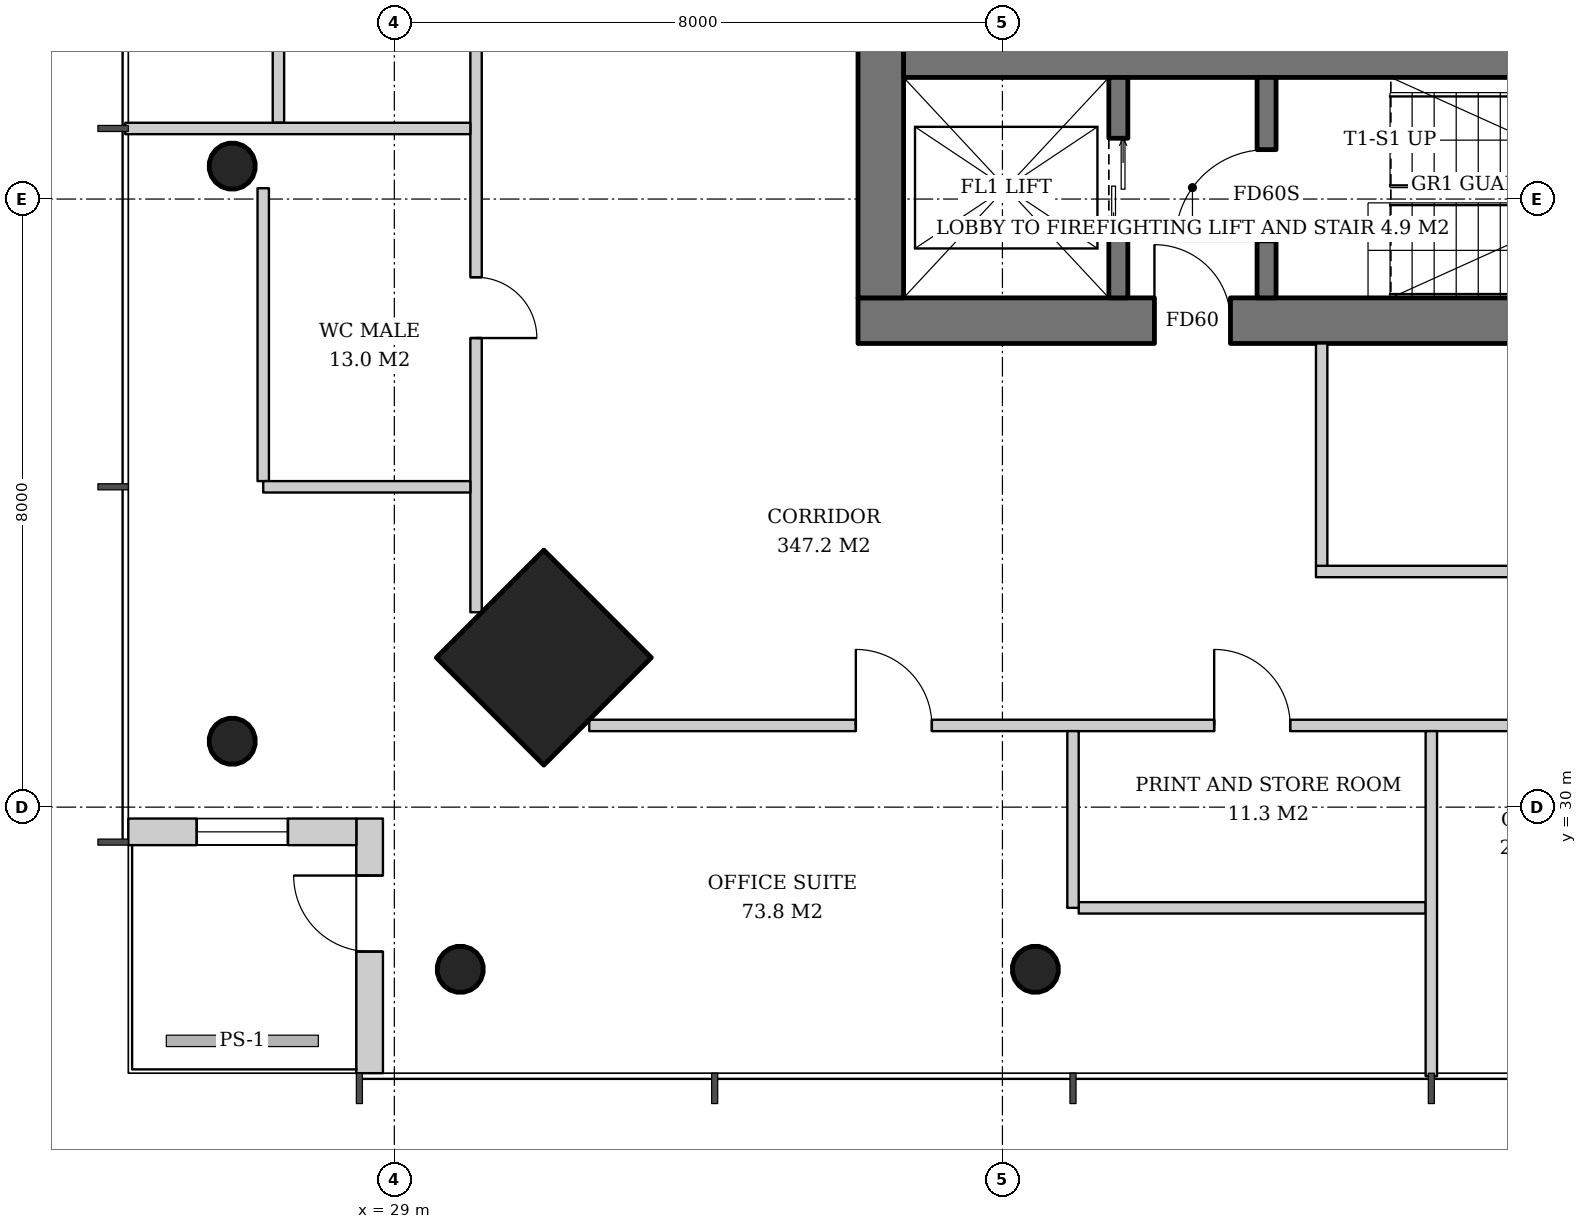
"""IFC4 building model, lengths in metres.
Left out: names, types, materials, properties, quantities, classifications, styles, units other than length and angle.
Written with IfcOpenShell. Run it as: python <this file> out.ifc"""

import sys

from ifc_helpers import new_model, si_unit, direction, frame, frame_2d, origin, origin_2d, place, context, subcontext, project, spatial, rectangle, hollow_circle, extrude, element, fill, save


model = new_model("IFC4")
c1 = context("Model", 3, precision=1e-05, world=origin(), true_north=direction((0.0, 1.0)))
c2 = subcontext(c1, "Body", "Model", "MODEL_VIEW")
j1 = project(units=[si_unit("LENGTHUNIT", "METRE"), si_unit("PLANEANGLEUNIT", "RADIAN")], contexts=[c1])
p1 = place(None, origin())
s1 = spatial("IfcSite", under=j1, at=p1, CompositionType="ELEMENT")
p2 = place(p1, origin())
s2 = spatial("IfcBuilding", under=s1, at=p2, CompositionType="ELEMENT")
p3 = place(p2, frame((0.0, 0.0, 203.4)))
s3 = spatial("IfcBuildingStorey", under=s2, at=p3, CompositionType="ELEMENT", Elevation=203.4)
p4 = place(p3, frame((30.928, 31.928, 0.0), z_axis=(0.031962158256, 0.031962158256, 0.998977898093), x_axis=(-0.707106781187, 0.707106781187, 0.0)))
e1 = element("IfcColumn", 1, at=p4, inside=s3, PredefinedType="COLUMN", context=c2, shape_type="SweptSolid", body=[
    extrude(rectangle(XDim=2.0, YDim=2.0, at=origin_2d()), origin(), (0.0, 0.0, 1.0), 3.804),
])
p5 = place(p3, frame((26.829, 30.829, 0.0), z_axis=(0.031898107953, 0.031898107953, 0.998981992539), x_axis=(-0.707106781187, 0.707106781187, 0.0)))
e2 = element("IfcColumn", 2, at=p5, inside=s3, PredefinedType="COLUMN", context=c2, shape_type="SweptSolid", body=[
    extrude(hollow_circle(Radius=0.305, WallThickness=0.025, at=origin_2d()), origin(), (0.0, 0.0, 1.0), 3.804),
])
p6 = place(p3, frame((26.829, 38.414, 0.0), z_axis=(0.031910269556, 0.015987237665, 0.999362868496), x_axis=(-0.447933021895, 0.894067115991, 0.0)))
e3 = element("IfcColumn", 3, at=p6, inside=s3, PredefinedType="COLUMN", context=c2, shape_type="SweptSolid", body=[
    extrude(hollow_circle(Radius=0.305, WallThickness=0.025, at=origin_2d()), origin(), (0.0, 0.0, 1.0), 3.802),
])
p7 = place(p3, frame((29.829, 27.829, 0.0), z_axis=(0.031898107953, 0.031898107953, 0.998981992539), x_axis=(-0.707106781187, 0.707106781187, 0.0)))
e4 = element("IfcColumn", 4, at=p7, inside=s3, PredefinedType="COLUMN", context=c2, shape_type="SweptSolid", body=[
    extrude(hollow_circle(Radius=0.305, WallThickness=0.025, at=origin_2d()), origin(), (0.0, 0.0, 1.0), 3.804),
])
p8 = place(p3, frame((37.414, 27.829, 0.0), z_axis=(0.015987237665, 0.031910269556, 0.999362868496), x_axis=(-0.894067115991, 0.447933021895, 0.0)))
e5 = element("IfcColumn", 5, at=p8, inside=s3, PredefinedType="COLUMN", context=c2, shape_type="SweptSolid", body=[
    extrude(hollow_circle(Radius=0.305, WallThickness=0.025, at=origin_2d()), origin(), (0.0, 0.0, 1.0), 3.802),
])
p9 = place(p3, frame((35.1, 36.4, 0.0), z_axis=(0.0, 0.0, 1.0), x_axis=(1.0, 0.0, 0.0)))
e6 = element("IfcWall", 6, at=p9, inside=s3, PredefinedType="SHEAR", context=c2, shape_type="SweptSolid", body=[
    extrude(rectangle(XDim=19.8, YDim=0.6, at=frame_2d((9.9, 0.0))), origin(), (0.0, 0.0, 1.0), 3.8),
])
p10 = place(p9, frame((3.9, 0.0, 0.0)))
e7 = element("IfcOpeningElement", 7, at=p10, cuts=e6, PredefinedType="OPENING", context=c2, shape_type="SweptSolid", body=[
    extrude(rectangle(XDim=1.0, YDim=2.1, at=frame_2d((0.5, 1.05))), frame((0.0, 0.31, 0.0), z_axis=(0.0, -1.0, 0.0), x_axis=(1.0, 0.0, 0.0)), (0.0, 0.0, 1.0), 0.62),
])
p11 = place(p9, frame((15.35, 0.0, 0.0)))
e8 = element("IfcOpeningElement", 8, at=p11, cuts=e6, PredefinedType="OPENING", context=c2, shape_type="SweptSolid", body=[
    extrude(rectangle(XDim=1.0, YDim=2.1, at=frame_2d((0.5, 1.05))), frame((0.0, 0.31, 0.0), z_axis=(0.0, -1.0, 0.0), x_axis=(1.0, 0.0, 0.0)), (0.0, 0.0, 1.0), 0.62),
])
p12 = place(p3, frame((35.4, 36.7, 0.0), z_axis=(0.0, 0.0, 1.0), x_axis=(0.0, 1.0, 0.0)))
e9 = element("IfcWall", 9, at=p12, inside=s3, PredefinedType="SHEAR", context=c2, shape_type="SweptSolid", body=[
    extrude(rectangle(XDim=18.6, YDim=0.6, at=frame_2d((9.3, 0.0))), origin(), (0.0, 0.0, 1.0), 3.8),
])
p13 = place(p12, frame((8.4, 0.0, 0.0)))
e10 = element("IfcOpeningElement", 10, at=p13, cuts=e9, PredefinedType="OPENING", context=c2, shape_type="SweptSolid", body=[
    extrude(rectangle(XDim=1.8, YDim=2.4, at=frame_2d((0.9, 1.2))), frame((0.0, 0.31, 0.0), z_axis=(0.0, -1.0, 0.0), x_axis=(1.0, 0.0, 0.0)), (0.0, 0.0, 1.0), 0.62),
])
p14 = place(p3, frame((35.7, 39.8, 0.0), z_axis=(0.0, 0.0, 1.0), x_axis=(1.0, 0.0, 0.0)))
e11 = element("IfcWall", 11, at=p14, inside=s3, PredefinedType="SHEAR", context=c2, shape_type="SweptSolid", body=[
    extrude(rectangle(XDim=18.6, YDim=0.4, at=frame_2d((9.3, 0.0))), origin(), (0.0, 0.0, 1.0), 3.8),
])
p15 = place(p3, frame((28.675, 26.5, 0.0), z_axis=(0.0, 0.0, 1.0), x_axis=(0.0, 1.0, 0.0)))
e12 = element("IfcWall", 12, at=p15, inside=s3, PredefinedType="SOLIDWALL", context=c2, shape_type="SweptSolid", body=[
    extrude(rectangle(XDim=3.35, YDim=0.35, at=frame_2d((1.675, 0.0))), origin(), (0.0, 0.0, 1.0), 3.62),
])
p16 = place(p15, frame((1.6, 0.0, 0.0)))
e13 = element("IfcOpeningElement", 13, at=p16, cuts=e12, PredefinedType="OPENING", context=c2, shape_type="SweptSolid", body=[
    extrude(rectangle(XDim=1.0, YDim=2.4, at=frame_2d((0.5, 1.2))), frame((0.0, 0.185, 0.0), z_axis=(0.0, -1.0, 0.0), x_axis=(1.0, 0.0, 0.0)), (0.0, 0.0, 1.0), 0.37),
])
p17 = place(p3, frame((28.5, 29.675, 0.0), z_axis=(0.0, 0.0, 1.0), x_axis=(-1.0, 0.0, 0.0)))
e14 = element("IfcWall", 14, at=p17, inside=s3, PredefinedType="SOLIDWALL", context=c2, shape_type="SweptSolid", body=[
    extrude(rectangle(XDim=3.0, YDim=0.35, at=frame_2d((1.5, 0.0))), origin(), (0.0, 0.0, 1.0), 3.62),
])
p18 = place(p17, frame((0.9, 0.0, 0.6)))
e15 = element("IfcOpeningElement", 15, at=p18, cuts=e14, PredefinedType="OPENING", context=c2, shape_type="SweptSolid", body=[
    extrude(rectangle(XDim=1.2, YDim=2.55, at=frame_2d((0.6, 1.275))), frame((0.0, 0.185, 0.0), z_axis=(0.0, -1.0, 0.0), x_axis=(1.0, 0.0, 0.0)), (0.0, 0.0, 1.0), 0.37),
])
p19 = place(p3, frame((38.525, 36.7, 0.0), z_axis=(0.0, 0.0, 1.0), x_axis=(0.0, 1.0, 0.0)))
e16 = element("IfcWall", 16, at=p19, inside=s3, PredefinedType="SHEAR", context=c2, shape_type="SweptSolid", body=[
    extrude(rectangle(XDim=2.9, YDim=0.25, at=frame_2d((1.45, 0.0))), origin(), (0.0, 0.0, 1.0), 3.8),
])
p20 = place(p19, frame((0.8, 0.0, 0.0)))
e17 = element("IfcOpeningElement", 17, at=p20, cuts=e16, PredefinedType="OPENING", context=c2, shape_type="SweptSolid", body=[
    extrude(rectangle(XDim=1.3, YDim=2.2, at=frame_2d((0.65, 1.1))), frame((0.0, 0.135, 0.0), z_axis=(0.0, -1.0, 0.0), x_axis=(1.0, 0.0, 0.0)), (0.0, 0.0, 1.0), 0.27),
])
p21 = place(p3, frame((40.475, 36.7, 0.0), z_axis=(0.0, 0.0, 1.0), x_axis=(0.0, 1.0, 0.0)))
e18 = element("IfcWall", 18, at=p21, inside=s3, PredefinedType="SHEAR", context=c2, shape_type="SweptSolid", body=[
    extrude(rectangle(XDim=2.9, YDim=0.25, at=frame_2d((1.45, 0.0))), origin(), (0.0, 0.0, 1.0), 3.8),
])
p22 = place(p21, frame((0.75, 0.0, 0.0)))
e19 = element("IfcOpeningElement", 19, at=p22, cuts=e18, PredefinedType="OPENING", context=c2, shape_type="SweptSolid", body=[
    extrude(rectangle(XDim=1.2, YDim=2.1, at=frame_2d((0.6, 1.05))), frame((0.0, 0.135, 0.0), z_axis=(0.0, -1.0, 0.0), x_axis=(1.0, 0.0, 0.0)), (0.0, 0.0, 1.0), 0.27),
])
p23 = place(p3, frame((41.125, 33.1, 0.0), z_axis=(0.0, 0.0, 1.0), x_axis=(1.0, 0.0, 0.0)))
e20 = element("IfcWall", 20, at=p23, inside=s3, PredefinedType="PARTITIONING", context=c2, shape_type="SweptSolid", body=[
    extrude(rectangle(XDim=8.2, YDim=0.15, at=frame_2d((4.1, 0.0))), origin(), (0.0, 0.0, 1.0), 2.867),
])
p24 = place(p23, frame((3.6, 0.0, 0.0)))
e21 = element("IfcOpeningElement", 21, at=p24, cuts=e20, PredefinedType="OPENING", context=c2, shape_type="SweptSolid", body=[
    extrude(rectangle(XDim=1.0, YDim=2.1, at=frame_2d((0.5, 1.05))), frame((0.0, 0.085, 0.0), z_axis=(0.0, -1.0, 0.0), x_axis=(1.0, 0.0, 0.0)), (0.0, 0.0, 1.0), 0.17),
])
p25 = place(p3, frame((41.2, 36.1, 0.0), z_axis=(0.0, 0.0, 1.0), x_axis=(0.0, -1.0, 0.0)))
e22 = element("IfcWall", 22, at=p25, inside=s3, PredefinedType="PARTITIONING", context=c2, shape_type="SweptSolid", body=[
    extrude(rectangle(XDim=2.925, YDim=0.15, at=frame_2d((1.462, 0.0))), origin(), (0.0, 0.0, 1.0), 3.62),
])
p26 = place(p3, frame((27.475, 43.568, 0.0), z_axis=(0.0, 0.0, 1.0), x_axis=(0.0, -1.0, 0.0)))
e23 = element("IfcWall", 23, at=p26, inside=s3, PredefinedType="PARTITIONING", context=c2, shape_type="SweptSolid", body=[
    extrude(rectangle(XDim=4.564, YDim=0.15, at=frame_2d((2.282, 0.0))), origin(), (0.0, 0.0, 1.0), 2.867),
])
p27 = place(p3, frame((27.275, 38.143, 0.0), z_axis=(0.0, 0.0, 1.0), x_axis=(0.0, -1.0, 0.0)))
e24 = element("IfcWall", 24, at=p27, inside=s3, PredefinedType="PARTITIONING", context=c2, shape_type="SweptSolid", body=[
    extrude(rectangle(XDim=3.853, YDim=0.15, at=frame_2d((1.927, 0.0))), origin(), (0.0, 0.0, 1.0), 2.867),
])
p28 = place(p3, frame((30.075, 59.436, 0.0), z_axis=(0.0, 0.0, 1.0), x_axis=(0.0, -1.0, 0.0)))
e25 = element("IfcWall", 25, at=p28, inside=s3, PredefinedType="PARTITIONING", context=c2, shape_type="SweptSolid", body=[
    extrude(rectangle(XDim=26.872, YDim=0.15, at=frame_2d((13.436, 0.0))), origin(), (0.0, 0.0, 1.0), 2.867),
])
p29 = place(p28, frame((3.507, 0.0, 0.0)))
e26 = element("IfcOpeningElement", 26, at=p29, cuts=e25, PredefinedType="OPENING", context=c2, shape_type="SweptSolid", body=[
    extrude(rectangle(XDim=1.0, YDim=2.1, at=frame_2d((0.5, 1.05))), frame((0.0, 0.085, 0.0), z_axis=(0.0, -1.0, 0.0), x_axis=(1.0, 0.0, 0.0)), (0.0, 0.0, 1.0), 0.17),
])
p30 = place(p28, frame((8.221, 0.0, 0.0)))
e27 = element("IfcOpeningElement", 27, at=p30, cuts=e25, PredefinedType="OPENING", context=c2, shape_type="SweptSolid", body=[
    extrude(rectangle(XDim=1.0, YDim=2.1, at=frame_2d((0.5, 1.05))), frame((0.0, 0.085, 0.0), z_axis=(0.0, -1.0, 0.0), x_axis=(1.0, 0.0, 0.0)), (0.0, 0.0, 1.0), 0.17),
])
p31 = place(p28, frame((13.036, 0.0, 0.0)))
e28 = element("IfcOpeningElement", 28, at=p31, cuts=e25, PredefinedType="OPENING", context=c2, shape_type="SweptSolid", body=[
    extrude(rectangle(XDim=0.8, YDim=2.1, at=frame_2d((0.4, 1.05))), frame((0.0, 0.085, 0.0), z_axis=(0.0, -1.0, 0.0), x_axis=(1.0, 0.0, 0.0)), (0.0, 0.0, 1.0), 0.17),
])
p32 = place(p28, frame((17.65, 0.0, 0.0)))
e29 = element("IfcOpeningElement", 29, at=p32, cuts=e25, PredefinedType="OPENING", context=c2, shape_type="SweptSolid", body=[
    extrude(rectangle(XDim=1.0, YDim=2.1, at=frame_2d((0.5, 1.05))), frame((0.0, 0.085, 0.0), z_axis=(0.0, -1.0, 0.0), x_axis=(1.0, 0.0, 0.0)), (0.0, 0.0, 1.0), 0.17),
])
p33 = place(p28, frame((22.464, 0.0, 0.0)))
e30 = element("IfcOpeningElement", 30, at=p33, cuts=e25, PredefinedType="OPENING", context=c2, shape_type="SweptSolid", body=[
    extrude(rectangle(XDim=0.8, YDim=2.1, at=frame_2d((0.4, 1.05))), frame((0.0, 0.085, 0.0), z_axis=(0.0, -1.0, 0.0), x_axis=(1.0, 0.0, 0.0)), (0.0, 0.0, 1.0), 0.17),
])
p34 = place(p3, frame((30.0, 38.928, 0.0), z_axis=(0.0, 0.0, 1.0), x_axis=(-1.0, 0.0, 0.0)))
e31 = element("IfcWall", 31, at=p34, inside=s3, PredefinedType="PARTITIONING", context=c2, shape_type="SweptSolid", body=[
    extrude(rectangle(XDim=4.54, YDim=0.15, at=frame_2d((2.27, 0.0))), origin(), (0.0, 0.0, 1.0), 3.12),
])
p35 = place(p3, frame((30.0, 34.214, 0.0), z_axis=(0.0, 0.0, 1.0), x_axis=(-1.0, 0.0, 0.0)))
e32 = element("IfcWall", 32, at=p35, inside=s3, PredefinedType="PARTITIONING", context=c2, shape_type="SweptSolid", body=[
    extrude(rectangle(XDim=2.725, YDim=0.15, at=frame_2d((1.363, 0.0))), origin(), (0.0, 0.0, 1.0), 3.62),
])
p36 = place(p3, frame((38.004, 28.675, 0.0), z_axis=(0.0, 0.0, 1.0), x_axis=(1.0, 0.0, 0.0)))
e33 = element("IfcWall", 33, at=p36, inside=s3, PredefinedType="PARTITIONING", context=c2, shape_type="SweptSolid", body=[
    extrude(rectangle(XDim=4.564, YDim=0.15, at=frame_2d((2.282, 0.0))), origin(), (0.0, 0.0, 1.0), 2.867),
])
p37 = place(p3, frame((31.564, 31.075, 0.0), z_axis=(0.0, 0.0, 1.0), x_axis=(1.0, 0.0, 0.0)))
e34 = element("IfcWall", 34, at=p37, inside=s3, PredefinedType="PARTITIONING", context=c2, shape_type="SweptSolid", body=[
    extrude(rectangle(XDim=26.872, YDim=0.15, at=frame_2d((13.436, 0.0))), origin(), (0.0, 0.0, 1.0), 2.867),
])
p38 = place(p37, frame((3.507, 0.0, 0.0)))
e35 = element("IfcOpeningElement", 35, at=p38, cuts=e34, PredefinedType="OPENING", context=c2, shape_type="SweptSolid", body=[
    extrude(rectangle(XDim=1.0, YDim=2.1, at=frame_2d((0.5, 1.05))), frame((0.0, 0.085, 0.0), z_axis=(0.0, -1.0, 0.0), x_axis=(1.0, 0.0, 0.0)), (0.0, 0.0, 1.0), 0.17),
])
p39 = place(p37, frame((8.221, 0.0, 0.0)))
e36 = element("IfcOpeningElement", 36, at=p39, cuts=e34, PredefinedType="OPENING", context=c2, shape_type="SweptSolid", body=[
    extrude(rectangle(XDim=1.0, YDim=2.1, at=frame_2d((0.5, 1.05))), frame((0.0, 0.085, 0.0), z_axis=(0.0, -1.0, 0.0), x_axis=(1.0, 0.0, 0.0)), (0.0, 0.0, 1.0), 0.17),
])
p40 = place(p37, frame((12.936, 0.0, 0.0)))
e37 = element("IfcOpeningElement", 37, at=p40, cuts=e34, PredefinedType="OPENING", context=c2, shape_type="SweptSolid", body=[
    extrude(rectangle(XDim=1.0, YDim=2.1, at=frame_2d((0.5, 1.05))), frame((0.0, 0.085, 0.0), z_axis=(0.0, -1.0, 0.0), x_axis=(1.0, 0.0, 0.0)), (0.0, 0.0, 1.0), 0.17),
])
p41 = place(p37, frame((17.65, 0.0, 0.0)))
e38 = element("IfcOpeningElement", 38, at=p41, cuts=e34, PredefinedType="OPENING", context=c2, shape_type="SweptSolid", body=[
    extrude(rectangle(XDim=1.0, YDim=2.1, at=frame_2d((0.5, 1.05))), frame((0.0, 0.085, 0.0), z_axis=(0.0, -1.0, 0.0), x_axis=(1.0, 0.0, 0.0)), (0.0, 0.0, 1.0), 0.17),
])
p42 = place(p37, frame((22.364, 0.0, 0.0)))
e39 = element("IfcOpeningElement", 39, at=p42, cuts=e34, PredefinedType="OPENING", context=c2, shape_type="SweptSolid", body=[
    extrude(rectangle(XDim=1.0, YDim=2.1, at=frame_2d((0.5, 1.05))), frame((0.0, 0.085, 0.0), z_axis=(0.0, -1.0, 0.0), x_axis=(1.0, 0.0, 0.0)), (0.0, 0.0, 1.0), 0.17),
])
p43 = place(p3, frame((37.928, 31.0, 0.0), z_axis=(0.0, 0.0, 1.0), x_axis=(0.0, -1.0, 0.0)))
e40 = element("IfcWall", 40, at=p43, inside=s3, PredefinedType="PARTITIONING", context=c2, shape_type="SweptSolid", body=[
    extrude(rectangle(XDim=2.325, YDim=0.15, at=frame_2d((1.163, 0.0))), origin(), (0.0, 0.0, 1.0), 3.62),
])
p44 = place(p3, frame((42.643, 31.0, 0.0), z_axis=(0.0, 0.0, 1.0), x_axis=(0.0, -1.0, 0.0)))
e41 = element("IfcWall", 41, at=p44, inside=s3, PredefinedType="PARTITIONING", context=c2, shape_type="SweptSolid", body=[
    extrude(rectangle(XDim=4.54, YDim=0.15, at=frame_2d((2.27, 0.0))), origin(), (0.0, 0.0, 1.0), 3.12),
])
p45 = place(p16, origin())
e42 = element("IfcDoor", 42, at=p45, inside=s3, OperationType="SINGLE_SWING_RIGHT", PredefinedType="DOOR", context=c2, shape_type="SweptSolid", body=[
    extrude(rectangle(XDim=1.0, YDim=2.4, at=frame_2d((0.5, 1.2))), frame((0.0, 0.025, 0.0), z_axis=(0.0, -1.0, 0.0), x_axis=(1.0, 0.0, 0.0)), (0.0, 0.0, 1.0), 0.05),
])
fill(e13, e42)
p46 = place(p18, origin())
e43 = element("IfcWindow", 43, at=p46, inside=s3, PartitioningType="SINGLE_PANEL", PredefinedType="WINDOW", context=c2, shape_type="SweptSolid", body=[
    extrude(rectangle(XDim=1.2, YDim=2.55, at=frame_2d((0.6, 1.275))), frame((0.0, 0.03, 0.0), z_axis=(0.0, -1.0, 0.0), x_axis=(1.0, 0.0, 0.0)), (0.0, 0.0, 1.0), 0.06),
])
fill(e15, e43)
p47 = place(p20, origin())
e44 = element("IfcDoor", 44, at=p47, inside=s3, OperationType="DOUBLE_DOOR_SLIDING", PredefinedType="DOOR", context=c2, shape_type="SweptSolid", body=[
    extrude(rectangle(XDim=1.3, YDim=2.2, at=frame_2d((0.65, 1.1))), frame((0.0, 0.025, 0.0), z_axis=(0.0, -1.0, 0.0), x_axis=(1.0, 0.0, 0.0)), (0.0, 0.0, 1.0), 0.05),
])
fill(e17, e44)
p48 = place(p22, origin())
e45 = element("IfcDoor", 45, at=p48, inside=s3, OperationType="SINGLE_SWING_LEFT", PredefinedType="DOOR", context=c2, shape_type="SweptSolid", body=[
    extrude(rectangle(XDim=1.2, YDim=2.1, at=frame_2d((0.6, 1.05))), frame((0.0, 0.025, 0.0), z_axis=(0.0, -1.0, 0.0), x_axis=(1.0, 0.0, 0.0)), (0.0, 0.0, 1.0), 0.05),
])
fill(e19, e45)
p49 = place(p10, origin())
e46 = element("IfcDoor", 46, at=p49, inside=s3, OperationType="SINGLE_SWING_LEFT", PredefinedType="DOOR", context=c2, shape_type="SweptSolid", body=[
    extrude(rectangle(XDim=1.0, YDim=2.1, at=frame_2d((0.5, 1.05))), frame((0.0, 0.025, 0.0), z_axis=(0.0, -1.0, 0.0), x_axis=(1.0, 0.0, 0.0)), (0.0, 0.0, 1.0), 0.05),
])
fill(e7, e46)
p50 = place(p33, origin())
e47 = element("IfcDoor", 47, at=p50, inside=s3, OperationType="SINGLE_SWING_RIGHT", PredefinedType="DOOR", context=c2, shape_type="SweptSolid", body=[
    extrude(rectangle(XDim=0.8, YDim=2.1, at=frame_2d((0.4, 1.05))), frame((0.0, 0.025, 0.0), z_axis=(0.0, -1.0, 0.0), x_axis=(1.0, 0.0, 0.0)), (0.0, 0.0, 1.0), 0.05),
])
fill(e30, e47)
p51 = place(p38, origin())
e48 = element("IfcDoor", 48, at=p51, inside=s3, OperationType="SINGLE_SWING_LEFT", PredefinedType="DOOR", context=c2, shape_type="SweptSolid", body=[
    extrude(rectangle(XDim=1.0, YDim=2.1, at=frame_2d((0.5, 1.05))), frame((0.0, 0.025, 0.0), z_axis=(0.0, -1.0, 0.0), x_axis=(1.0, 0.0, 0.0)), (0.0, 0.0, 1.0), 0.05),
])
fill(e35, e48)
p52 = place(p39, origin())
e49 = element("IfcDoor", 49, at=p52, inside=s3, OperationType="SINGLE_SWING_LEFT", PredefinedType="DOOR", context=c2, shape_type="SweptSolid", body=[
    extrude(rectangle(XDim=1.0, YDim=2.1, at=frame_2d((0.5, 1.05))), frame((0.0, 0.025, 0.0), z_axis=(0.0, -1.0, 0.0), x_axis=(1.0, 0.0, 0.0)), (0.0, 0.0, 1.0), 0.05),
])
fill(e36, e49)
save(model, sys.argv[1])
